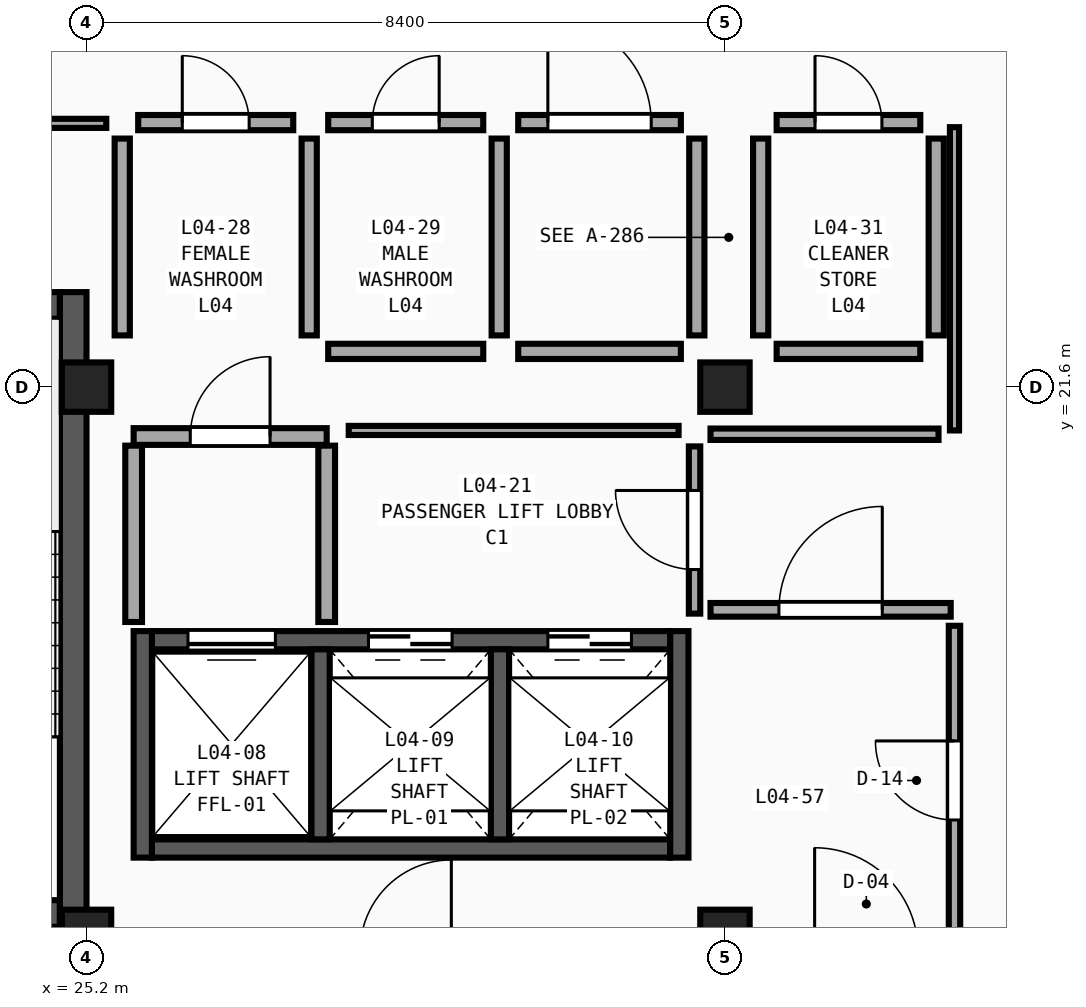
"""IFC4 building model, lengths in metres.
Left out: names, types, materials, properties, quantities, classifications, styles, units other than length and angle.
Written with IfcOpenShell. Run it as: python <this file> out.ifc"""

import sys

from ifc_helpers import new_model, si_unit, direction, frame, frame_2d, origin, origin_2d, place, context, subcontext, project, spatial, rectangle, extrude, element, fill, save


model = new_model("IFC4")
c1 = context("Model", 3, precision=1e-05, world=origin(), true_north=direction((0.0, 1.0)))
c2 = subcontext(c1, "Body", "Model", "MODEL_VIEW")
j1 = project(units=[si_unit("LENGTHUNIT", "METRE"), si_unit("PLANEANGLEUNIT", "RADIAN")], contexts=[c1])
p1 = place(None, origin())
s1 = spatial("IfcSite", under=j1, at=p1, CompositionType="ELEMENT")
p2 = place(p1, origin())
s2 = spatial("IfcBuilding", under=s1, at=p2, CompositionType="ELEMENT")
p3 = place(p2, frame((0.0, 0.0, 18.9)))
s3 = spatial("IfcBuildingStorey", under=s2, at=p3, CompositionType="ELEMENT", Elevation=18.9)
for number, where, z_axis, x_axis in (
    (1, (25.2, 14.4, 0.0), (0.0, 0.0, 1.0), (1.0, 0.0, 0.0)),
    (2, (25.2, 21.6, 0.0), (0.0, 0.0, 1.0), (1.0, 0.0, 0.0)),
    (3, (33.6, 14.4, 0.0), (0.0, 0.0, 1.0), (1.0, 0.0, 0.0)),
    (4, (33.6, 21.6, 0.0), (0.0, 0.0, 1.0), (1.0, 0.0, 0.0)),
):
    element("IfcColumn", number, at=place(p3, frame(where, z_axis=z_axis, x_axis=x_axis)), inside=s3, PredefinedType="COLUMN", context=c2, shape_type="SweptSolid", body=[
        extrude(rectangle(XDim=0.65, YDim=0.65, at=origin_2d()), origin(), (0.0, 0.0, 1.0), 4.5),
    ])
p4 = place(p3, frame((24.85, 14.675, 0.0), z_axis=(0.0, 0.0, 1.0), x_axis=(-1.0, 0.0, 0.0)))
e5 = element("IfcWall", 5, at=p4, inside=s3, PredefinedType="SHEAR", context=c2, shape_type="SweptSolid", body=[
    extrude(rectangle(XDim=7.7, YDim=0.35, at=frame_2d((3.85, 0.0))), origin(), (0.0, 0.0, 1.0), 4.5),
])
p5 = place(p4, frame((3.3, 0.0, 0.0)))
e6 = element("IfcOpeningElement", 6, at=p5, cuts=e5, PredefinedType="OPENING", context=c2, shape_type="SweptSolid", body=[
    extrude(rectangle(XDim=1.1, YDim=2.2, at=frame_2d((0.55, 1.1))), frame((0.0, 0.195, 0.0), z_axis=(0.0, -1.0, 0.0), x_axis=(1.0, 0.0, 0.0)), (0.0, 0.0, 1.0), 0.39),
])
p6 = place(p3, frame((17.15, 22.675, 0.0), z_axis=(0.0, 0.0, 1.0), x_axis=(1.0, 0.0, 0.0)))
e7 = element("IfcWall", 7, at=p6, inside=s3, PredefinedType="SHEAR", context=c2, shape_type="SweptSolid", body=[
    extrude(rectangle(XDim=7.7, YDim=0.35, at=frame_2d((3.85, 0.0))), origin(), (0.0, 0.0, 1.0), 4.5),
])
p7 = place(p3, frame((25.025, 14.5, 0.0), z_axis=(0.0, 0.0, 1.0), x_axis=(0.0, 1.0, 0.0)))
e8 = element("IfcWall", 8, at=p7, inside=s3, PredefinedType="SHEAR", context=c2, shape_type="SweptSolid", body=[
    extrude(rectangle(XDim=8.35, YDim=0.35, at=frame_2d((4.175, 0.0))), origin(), (0.0, 0.0, 1.0), 4.5),
])
p8 = place(p3, frame((32.88, 18.27, 0.0), z_axis=(0.0, 0.0, 1.0), x_axis=(-1.0, 0.0, 0.0)))
e9 = element("IfcWall", 9, at=p8, inside=s3, PredefinedType="SHEAR", context=c2, shape_type="SweptSolid", body=[
    extrude(rectangle(XDim=6.82, YDim=0.24, at=frame_2d((3.41, 0.0))), origin(), (0.0, 0.0, 1.0), 4.18),
])
p9 = place(p8, frame((5.195, 0.0, 0.0)))
e10 = element("IfcOpeningElement", 10, at=p9, cuts=e9, PredefinedType="OPENING", context=c2, shape_type="SweptSolid", body=[
    extrude(rectangle(XDim=1.15, YDim=2.25, at=frame_2d((0.575, 1.125))), frame((0.0, 0.14, 0.0), z_axis=(0.0, -1.0, 0.0), x_axis=(1.0, 0.0, 0.0)), (0.0, 0.0, 1.0), 0.28),
])
p10 = place(p8, frame((2.87, 0.0, 0.0)))
e11 = element("IfcOpeningElement", 11, at=p10, cuts=e9, PredefinedType="OPENING", context=c2, shape_type="SweptSolid", body=[
    extrude(rectangle(XDim=1.1, YDim=2.2, at=frame_2d((0.55, 1.1))), frame((0.0, 0.14, 0.0), z_axis=(0.0, -1.0, 0.0), x_axis=(1.0, 0.0, 0.0)), (0.0, 0.0, 1.0), 0.28),
])
p11 = place(p8, frame((0.51, 0.0, 0.0)))
e12 = element("IfcOpeningElement", 12, at=p11, cuts=e9, PredefinedType="OPENING", context=c2, shape_type="SweptSolid", body=[
    extrude(rectangle(XDim=1.1, YDim=2.2, at=frame_2d((0.55, 1.1))), frame((0.0, 0.14, 0.0), z_axis=(0.0, -1.0, 0.0), x_axis=(1.0, 0.0, 0.0)), (0.0, 0.0, 1.0), 0.28),
])
p12 = place(p3, frame((26.06, 15.53, 0.0), z_axis=(0.0, 0.0, 1.0), x_axis=(1.0, 0.0, 0.0)))
e13 = element("IfcWall", 13, at=p12, inside=s3, PredefinedType="SHEAR", context=c2, shape_type="SweptSolid", body=[
    extrude(rectangle(XDim=6.82, YDim=0.24, at=frame_2d((3.41, 0.0))), origin(), (0.0, 0.0, 1.0), 4.18),
])
for number, where, z_axis, x_axis in (
    (14, (25.94, 18.39, 0.0), (0.0, 0.0, 1.0), (0.0, -1.0, 0.0)),
    (15, (33.0, 15.41, 0.0), (0.0, 0.0, 1.0), (0.0, 1.0, 0.0)),
):
    element("IfcWall", number, at=place(p3, frame(where, z_axis=z_axis, x_axis=x_axis)), inside=s3, PredefinedType="SHEAR", context=c2, shape_type="SweptSolid", body=[
        extrude(rectangle(XDim=2.98, YDim=0.24, at=frame_2d((1.49, 0.0))), origin(), (0.0, 0.0, 1.0), 4.18),
    ])
for number, where, z_axis, x_axis in (
    (16, (28.28, 15.65, 0.0), (0.0, 0.0, 1.0), (0.0, 1.0, 0.0)),
    (17, (30.64, 15.65, 0.0), (0.0, 0.0, 1.0), (0.0, 1.0, 0.0)),
):
    element("IfcWall", number, at=place(p3, frame(where, z_axis=z_axis, x_axis=x_axis)), inside=s3, PredefinedType="SHEAR", context=c2, shape_type="SweptSolid", body=[
        extrude(rectangle(XDim=2.5, YDim=0.24, at=frame_2d((1.25, 0.0))), origin(), (0.0, 0.0, 1.0), 4.18),
    ])
p13 = place(p3, frame((25.82, 20.95, 0.0), z_axis=(0.0, 0.0, 1.0), x_axis=(1.0, 0.0, 0.0)))
e18 = element("IfcWall", 18, at=p13, inside=s3, PredefinedType="SOLIDWALL", context=c2, shape_type="SweptSolid", body=[
    extrude(rectangle(XDim=2.54, YDim=0.22, at=frame_2d((1.27, 0.0))), origin(), (0.0, 0.0, 1.0), 3.73),
])
p14 = place(p13, frame((0.745, 0.0, 0.0)))
e19 = element("IfcOpeningElement", 19, at=p14, cuts=e18, PredefinedType="OPENING", context=c2, shape_type="SweptSolid", body=[
    extrude(rectangle(XDim=1.05, YDim=2.15, at=frame_2d((0.525, 1.075))), frame((0.0, 0.13, 0.0), z_axis=(0.0, -1.0, 0.0), x_axis=(1.0, 0.0, 0.0)), (0.0, 0.0, 1.0), 0.26),
])
for number, where, z_axis, x_axis in (
    (20, (25.82, 18.51, 0.0), (0.0, 0.0, 1.0), (0.0, 1.0, 0.0)),
    (21, (28.36, 18.51, 0.0), (0.0, 0.0, 1.0), (0.0, 1.0, 0.0)),
):
    element("IfcWall", number, at=place(p3, frame(where, z_axis=z_axis, x_axis=x_axis)), inside=s3, PredefinedType="SOLIDWALL", context=c2, shape_type="SweptSolid", body=[
        extrude(rectangle(XDim=2.32, YDim=0.22, at=frame_2d((1.16, 0.0))), origin(), (0.0, 0.0, 1.0), 4.18),
    ])
p15 = place(p3, frame((28.65, 21.03, 0.0), z_axis=(0.0, 0.0, 1.0), x_axis=(1.0, 0.0, 0.0)))
e22 = element("IfcWall", 22, at=p15, inside=s3, PredefinedType="PARTITIONING", context=c2, shape_type="SweptSolid", body=[
    extrude(rectangle(XDim=4.34, YDim=0.12, at=frame_2d((2.17, 0.0))), origin(), (0.0, 0.0, 1.0), 3.73),
])
p16 = place(p3, frame((36.62, 14.39, 0.0), z_axis=(0.0, 0.0, 1.0), x_axis=(0.0, 1.0, 0.0)))
e23 = element("IfcWall", 23, at=p16, inside=s3, PredefinedType="PARTITIONING", context=c2, shape_type="SweptSolid", body=[
    extrude(rectangle(XDim=4.07, YDim=0.15, at=frame_2d((2.035, 0.0))), origin(), (0.0, 0.0, 1.0), 4.18),
])
p17 = place(p16, frame((1.515, 0.0, 0.0)))
e24 = element("IfcOpeningElement", 24, at=p17, cuts=e23, PredefinedType="OPENING", context=c2, shape_type="SweptSolid", body=[
    extrude(rectangle(XDim=1.04, YDim=2.21, at=frame_2d((0.52, 1.105))), frame((0.0, 0.095, 0.0), z_axis=(0.0, -1.0, 0.0), x_axis=(1.0, 0.0, 0.0)), (0.0, 0.0, 1.0), 0.19),
])
p18 = place(p3, frame((36.62, 21.03, 0.0), z_axis=(0.0, 0.0, 1.0), x_axis=(0.0, 1.0, 0.0)))
e25 = element("IfcWall", 25, at=p18, inside=s3, PredefinedType="PARTITIONING", context=c2, shape_type="SweptSolid", body=[
    extrude(rectangle(XDim=3.99, YDim=0.12, at=frame_2d((1.995, 0.0))), origin(), (0.0, 0.0, 1.0), 4.18),
])
p19 = place(p3, frame((22.24, 25.07, 0.0), z_axis=(0.0, 0.0, 1.0), x_axis=(1.0, 0.0, 0.0)))
e26 = element("IfcWall", 26, at=p19, inside=s3, PredefinedType="PARTITIONING", context=c2, shape_type="SweptSolid", body=[
    extrude(rectangle(XDim=3.22, YDim=0.12, at=frame_2d((1.61, 0.0))), origin(), (0.0, 0.0, 1.0), 4.18),
])
p20 = place(p19, frame((1.01, 0.0, 0.0)))
e27 = element("IfcOpeningElement", 27, at=p20, cuts=e26, PredefinedType="OPENING", context=c2, shape_type="SweptSolid", body=[
    extrude(rectangle(XDim=1.2, YDim=2.29, at=frame_2d((0.6, 1.145))), frame((0.0, 0.08, 0.0), z_axis=(0.0, -1.0, 0.0), x_axis=(1.0, 0.0, 0.0)), (0.0, 0.0, 1.0), 0.16),
])
p21 = place(p3, frame((33.41, 18.67, 0.0), z_axis=(0.0, 0.0, 1.0), x_axis=(1.0, 0.0, 0.0)))
e28 = element("IfcWall", 28, at=p21, inside=s3, PredefinedType="PARTITIONING", context=c2, shape_type="SweptSolid", body=[
    extrude(rectangle(XDim=3.16, YDim=0.18, at=frame_2d((1.58, 0.0))), origin(), (0.0, 0.0, 1.0), 4.18),
])
p22 = place(p21, frame((0.9, 0.0, 0.0)))
e29 = element("IfcOpeningElement", 29, at=p22, cuts=e28, PredefinedType="OPENING", context=c2, shape_type="SweptSolid", body=[
    extrude(rectangle(XDim=1.36, YDim=2.29, at=frame_2d((0.68, 1.145))), frame((0.0, 0.11, 0.0), z_axis=(0.0, -1.0, 0.0), x_axis=(1.0, 0.0, 0.0)), (0.0, 0.0, 1.0), 0.22),
])
p23 = place(p3, frame((33.41, 20.98, 0.0), z_axis=(0.0, 0.0, 1.0), x_axis=(1.0, 0.0, 0.0)))
e30 = element("IfcWall", 30, at=p23, inside=s3, PredefinedType="PARTITIONING", context=c2, shape_type="SweptSolid", body=[
    extrude(rectangle(XDim=3.0, YDim=0.15, at=frame_2d((1.5, 0.0))), origin(), (0.0, 0.0, 1.0), 3.73),
])
p24 = place(p3, frame((33.2, 18.62, 0.0), z_axis=(0.0, 0.0, 1.0), x_axis=(0.0, 1.0, 0.0)))
e31 = element("IfcWall", 31, at=p24, inside=s3, PredefinedType="PARTITIONING", context=c2, shape_type="SweptSolid", body=[
    extrude(rectangle(XDim=2.2, YDim=0.15, at=frame_2d((1.1, 0.0))), origin(), (0.0, 0.0, 1.0), 3.73),
])
p25 = place(p24, frame((0.58, 0.0, 0.0)))
e32 = element("IfcOpeningElement", 32, at=p25, cuts=e31, PredefinedType="OPENING", context=c2, shape_type="SweptSolid", body=[
    extrude(rectangle(XDim=1.04, YDim=2.45, at=frame_2d((0.52, 1.225))), frame((0.0, 0.095, 0.0), z_axis=(0.0, -1.0, 0.0), x_axis=(1.0, 0.0, 0.0)), (0.0, 0.0, 1.0), 0.19),
])
p26 = place(p3, frame((30.88, 25.08, 0.0), z_axis=(0.0, 0.0, 1.0), x_axis=(1.0, 0.0, 0.0)))
e33 = element("IfcWall", 33, at=p26, inside=s3, PredefinedType="PLUMBINGWALL", context=c2, shape_type="SweptSolid", body=[
    extrude(rectangle(XDim=2.14, YDim=0.2, at=frame_2d((1.07, 0.0))), origin(), (0.0, 0.0, 1.0), 4.18),
])
p27 = place(p26, frame((0.39, 0.0, 0.0)))
e34 = element("IfcOpeningElement", 34, at=p27, cuts=e33, PredefinedType="OPENING", context=c2, shape_type="SweptSolid", body=[
    extrude(rectangle(XDim=1.36, YDim=2.45, at=frame_2d((0.68, 1.225))), frame((0.0, 0.12, 0.0), z_axis=(0.0, -1.0, 0.0), x_axis=(1.0, 0.0, 0.0)), (0.0, 0.0, 1.0), 0.24),
])
p28 = place(p3, frame((25.88, 25.08, 0.0), z_axis=(0.0, 0.0, 1.0), x_axis=(1.0, 0.0, 0.0)))
e35 = element("IfcWall", 35, at=p28, inside=s3, PredefinedType="PLUMBINGWALL", context=c2, shape_type="SweptSolid", body=[
    extrude(rectangle(XDim=2.04, YDim=0.2, at=frame_2d((1.02, 0.0))), origin(), (0.0, 0.0, 1.0), 4.18),
])
p29 = place(p28, frame((0.58, 0.0, 0.0)))
e36 = element("IfcOpeningElement", 36, at=p29, cuts=e35, PredefinedType="OPENING", context=c2, shape_type="SweptSolid", body=[
    extrude(rectangle(XDim=0.88, YDim=2.05, at=frame_2d((0.44, 1.025))), frame((0.0, 0.12, 0.0), z_axis=(0.0, -1.0, 0.0), x_axis=(1.0, 0.0, 0.0)), (0.0, 0.0, 1.0), 0.24),
])
p30 = place(p3, frame((28.38, 25.08, 0.0), z_axis=(0.0, 0.0, 1.0), x_axis=(1.0, 0.0, 0.0)))
e37 = element("IfcWall", 37, at=p30, inside=s3, PredefinedType="PLUMBINGWALL", context=c2, shape_type="SweptSolid", body=[
    extrude(rectangle(XDim=2.04, YDim=0.2, at=frame_2d((1.02, 0.0))), origin(), (0.0, 0.0, 1.0), 4.18),
])
p31 = place(p30, frame((0.58, 0.0, 0.0)))
e38 = element("IfcOpeningElement", 38, at=p31, cuts=e37, PredefinedType="OPENING", context=c2, shape_type="SweptSolid", body=[
    extrude(rectangle(XDim=0.88, YDim=2.05, at=frame_2d((0.44, 1.025))), frame((0.0, 0.12, 0.0), z_axis=(0.0, -1.0, 0.0), x_axis=(1.0, 0.0, 0.0)), (0.0, 0.0, 1.0), 0.24),
])
p32 = place(p3, frame((34.28, 25.08, 0.0), z_axis=(0.0, 0.0, 1.0), x_axis=(1.0, 0.0, 0.0)))
e39 = element("IfcWall", 39, at=p32, inside=s3, PredefinedType="PLUMBINGWALL", context=c2, shape_type="SweptSolid", body=[
    extrude(rectangle(XDim=1.89, YDim=0.2, at=frame_2d((0.945, 0.0))), origin(), (0.0, 0.0, 1.0), 4.18),
])
p33 = place(p32, frame((0.505, 0.0, 0.0)))
e40 = element("IfcOpeningElement", 40, at=p33, cuts=e39, PredefinedType="OPENING", context=c2, shape_type="SweptSolid", body=[
    extrude(rectangle(XDim=0.88, YDim=2.05, at=frame_2d((0.44, 1.025))), frame((0.0, 0.12, 0.0), z_axis=(0.0, -1.0, 0.0), x_axis=(1.0, 0.0, 0.0)), (0.0, 0.0, 1.0), 0.24),
])
for number, where, z_axis, x_axis in (
    (41, (28.13, 22.28, 0.0), (0.0, 0.0, 1.0), (0.0, 1.0, 0.0)),
    (42, (25.67, 22.28, 0.0), (0.0, 0.0, 1.0), (0.0, 1.0, 0.0)),
    (43, (30.63, 22.28, 0.0), (0.0, 0.0, 1.0), (0.0, 1.0, 0.0)),
):
    element("IfcWall", number, at=place(p3, frame(where, z_axis=z_axis, x_axis=x_axis)), inside=s3, PredefinedType="PLUMBINGWALL", context=c2, shape_type="SweptSolid", body=[
        extrude(rectangle(XDim=2.59, YDim=0.2, at=frame_2d((1.295, 0.0))), origin(), (0.0, 0.0, 1.0), 4.18),
    ])
p34 = place(p3, frame((33.23, 22.28, 0.0), z_axis=(0.0, 0.0, 1.0), x_axis=(0.0, 1.0, 0.0)))
e44 = element("IfcWall", 44, at=p34, inside=s3, PredefinedType="PLUMBINGWALL", context=c2, shape_type="SweptSolid", body=[
    extrude(rectangle(XDim=2.59, YDim=0.2, at=frame_2d((1.295, 0.0))), origin(), (0.0, 0.0, 1.0), 3.73),
])
p35 = place(p3, frame((36.38, 22.28, 0.0), z_axis=(0.0, 0.0, 1.0), x_axis=(0.0, 1.0, 0.0)))
e45 = element("IfcWall", 45, at=p35, inside=s3, PredefinedType="PLUMBINGWALL", context=c2, shape_type="SweptSolid", body=[
    extrude(rectangle(XDim=2.59, YDim=0.2, at=frame_2d((1.295, 0.0))), origin(), (0.0, 0.0, 1.0), 4.18),
])
p36 = place(p3, frame((34.07, 22.28, 0.0), z_axis=(0.0, 0.0, 1.0), x_axis=(0.0, 1.0, 0.0)))
e46 = element("IfcWall", 46, at=p36, inside=s3, PredefinedType="PLUMBINGWALL", context=c2, shape_type="SweptSolid", body=[
    extrude(rectangle(XDim=2.59, YDim=0.2, at=frame_2d((1.295, 0.0))), origin(), (0.0, 0.0, 1.0), 3.73),
])
p37 = place(p3, frame((30.88, 22.07, 0.0), z_axis=(0.0, 0.0, 1.0), x_axis=(1.0, 0.0, 0.0)))
e47 = element("IfcWall", 47, at=p37, inside=s3, PredefinedType="PLUMBINGWALL", context=c2, shape_type="SweptSolid", body=[
    extrude(rectangle(XDim=2.14, YDim=0.2, at=frame_2d((1.07, 0.0))), origin(), (0.0, 0.0, 1.0), 3.73),
])
p38 = place(p3, frame((28.38, 22.07, 0.0), z_axis=(0.0, 0.0, 1.0), x_axis=(1.0, 0.0, 0.0)))
e48 = element("IfcWall", 48, at=p38, inside=s3, PredefinedType="PLUMBINGWALL", context=c2, shape_type="SweptSolid", body=[
    extrude(rectangle(XDim=2.04, YDim=0.2, at=frame_2d((1.02, 0.0))), origin(), (0.0, 0.0, 1.0), 3.73),
])
p39 = place(p3, frame((34.28, 22.07, 0.0), z_axis=(0.0, 0.0, 1.0), x_axis=(1.0, 0.0, 0.0)))
e49 = element("IfcWall", 49, at=p39, inside=s3, PredefinedType="PLUMBINGWALL", context=c2, shape_type="SweptSolid", body=[
    extrude(rectangle(XDim=1.89, YDim=0.2, at=frame_2d((0.945, 0.0))), origin(), (0.0, 0.0, 1.0), 3.73),
])
p40 = place(p9, origin())
e50 = element("IfcDoor", 50, at=p40, inside=s3, OperationType="SLIDING_TO_LEFT", PredefinedType="DOOR", context=c2, shape_type="SweptSolid", body=[
    extrude(rectangle(XDim=1.15, YDim=2.25, at=frame_2d((0.575, 1.125))), frame((0.0, 0.025, 0.0), z_axis=(0.0, -1.0, 0.0), x_axis=(1.0, 0.0, 0.0)), (0.0, 0.0, 1.0), 0.05),
])
fill(e10, e50)
p41 = place(p10, origin())
e51 = element("IfcDoor", 51, at=p41, inside=s3, OperationType="DOUBLE_DOOR_SLIDING", PredefinedType="DOOR", context=c2, shape_type="SweptSolid", body=[
    extrude(rectangle(XDim=1.1, YDim=2.2, at=frame_2d((0.55, 1.1))), frame((0.0, 0.025, 0.0), z_axis=(0.0, -1.0, 0.0), x_axis=(1.0, 0.0, 0.0)), (0.0, 0.0, 1.0), 0.05),
])
fill(e11, e51)
p42 = place(p11, origin())
e52 = element("IfcDoor", 52, at=p42, inside=s3, OperationType="DOUBLE_DOOR_SLIDING", PredefinedType="DOOR", context=c2, shape_type="SweptSolid", body=[
    extrude(rectangle(XDim=1.1, YDim=2.2, at=frame_2d((0.55, 1.1))), frame((0.0, 0.025, 0.0), z_axis=(0.0, -1.0, 0.0), x_axis=(1.0, 0.0, 0.0)), (0.0, 0.0, 1.0), 0.05),
])
fill(e12, e52)
p43 = place(p14, origin())
e53 = element("IfcDoor", 53, at=p43, inside=s3, OperationType="SINGLE_SWING_RIGHT", PredefinedType="DOOR", context=c2, shape_type="SweptSolid", body=[
    extrude(rectangle(XDim=1.05, YDim=2.15, at=frame_2d((0.525, 1.075))), frame((0.0, 0.025, 0.0), z_axis=(0.0, -1.0, 0.0), x_axis=(1.0, 0.0, 0.0)), (0.0, 0.0, 1.0), 0.05),
])
fill(e19, e53)
p44 = place(p17, origin())
e54 = element("IfcDoor", 54, at=p44, inside=s3, OperationType="SINGLE_SWING_RIGHT", PredefinedType="DOOR", context=c2, shape_type="SweptSolid", body=[
    extrude(rectangle(XDim=1.04, YDim=2.21, at=frame_2d((0.52, 1.105))), frame((0.0, 0.025, 0.0), z_axis=(0.0, -1.0, 0.0), x_axis=(1.0, 0.0, 0.0)), (0.0, 0.0, 1.0), 0.05),
])
fill(e24, e54)
p45 = place(p22, origin())
e55 = element("IfcDoor", 55, at=p45, inside=s3, OperationType="SINGLE_SWING_RIGHT", PredefinedType="DOOR", context=c2, shape_type="SweptSolid", body=[
    extrude(rectangle(XDim=1.36, YDim=2.29, at=frame_2d((0.68, 1.145))), frame((0.0, 0.025, 0.0), z_axis=(0.0, -1.0, 0.0), x_axis=(1.0, 0.0, 0.0)), (0.0, 0.0, 1.0), 0.05),
])
fill(e29, e55)
p46 = place(p25, origin())
e56 = element("IfcDoor", 56, at=p46, inside=s3, OperationType="SINGLE_SWING_RIGHT", PredefinedType="DOOR", context=c2, shape_type="SweptSolid", body=[
    extrude(rectangle(XDim=1.04, YDim=2.45, at=frame_2d((0.52, 1.225))), frame((0.0, 0.025, 0.0), z_axis=(0.0, -1.0, 0.0), x_axis=(1.0, 0.0, 0.0)), (0.0, 0.0, 1.0), 0.05),
])
fill(e32, e56)
p47 = place(p27, origin())
e57 = element("IfcDoor", 57, at=p47, inside=s3, OperationType="SINGLE_SWING_LEFT", PredefinedType="DOOR", context=c2, shape_type="SweptSolid", body=[
    extrude(rectangle(XDim=1.36, YDim=2.45, at=frame_2d((0.68, 1.225))), frame((0.0, 0.025, 0.0), z_axis=(0.0, -1.0, 0.0), x_axis=(1.0, 0.0, 0.0)), (0.0, 0.0, 1.0), 0.05),
])
fill(e34, e57)
p48 = place(p29, origin())
e58 = element("IfcDoor", 58, at=p48, inside=s3, OperationType="SINGLE_SWING_LEFT", PredefinedType="DOOR", context=c2, shape_type="SweptSolid", body=[
    extrude(rectangle(XDim=0.88, YDim=2.05, at=frame_2d((0.44, 1.025))), frame((0.0, 0.025, 0.0), z_axis=(0.0, -1.0, 0.0), x_axis=(1.0, 0.0, 0.0)), (0.0, 0.0, 1.0), 0.05),
])
fill(e36, e58)
p49 = place(p31, origin())
e59 = element("IfcDoor", 59, at=p49, inside=s3, OperationType="SINGLE_SWING_RIGHT", PredefinedType="DOOR", context=c2, shape_type="SweptSolid", body=[
    extrude(rectangle(XDim=0.88, YDim=2.05, at=frame_2d((0.44, 1.025))), frame((0.0, 0.025, 0.0), z_axis=(0.0, -1.0, 0.0), x_axis=(1.0, 0.0, 0.0)), (0.0, 0.0, 1.0), 0.05),
])
fill(e38, e59)
p50 = place(p33, origin())
e60 = element("IfcDoor", 60, at=p50, inside=s3, OperationType="SINGLE_SWING_LEFT", PredefinedType="DOOR", context=c2, shape_type="SweptSolid", body=[
    extrude(rectangle(XDim=0.88, YDim=2.05, at=frame_2d((0.44, 1.025))), frame((0.0, 0.025, 0.0), z_axis=(0.0, -1.0, 0.0), x_axis=(1.0, 0.0, 0.0)), (0.0, 0.0, 1.0), 0.05),
])
fill(e40, e60)
save(model, sys.argv[1])
